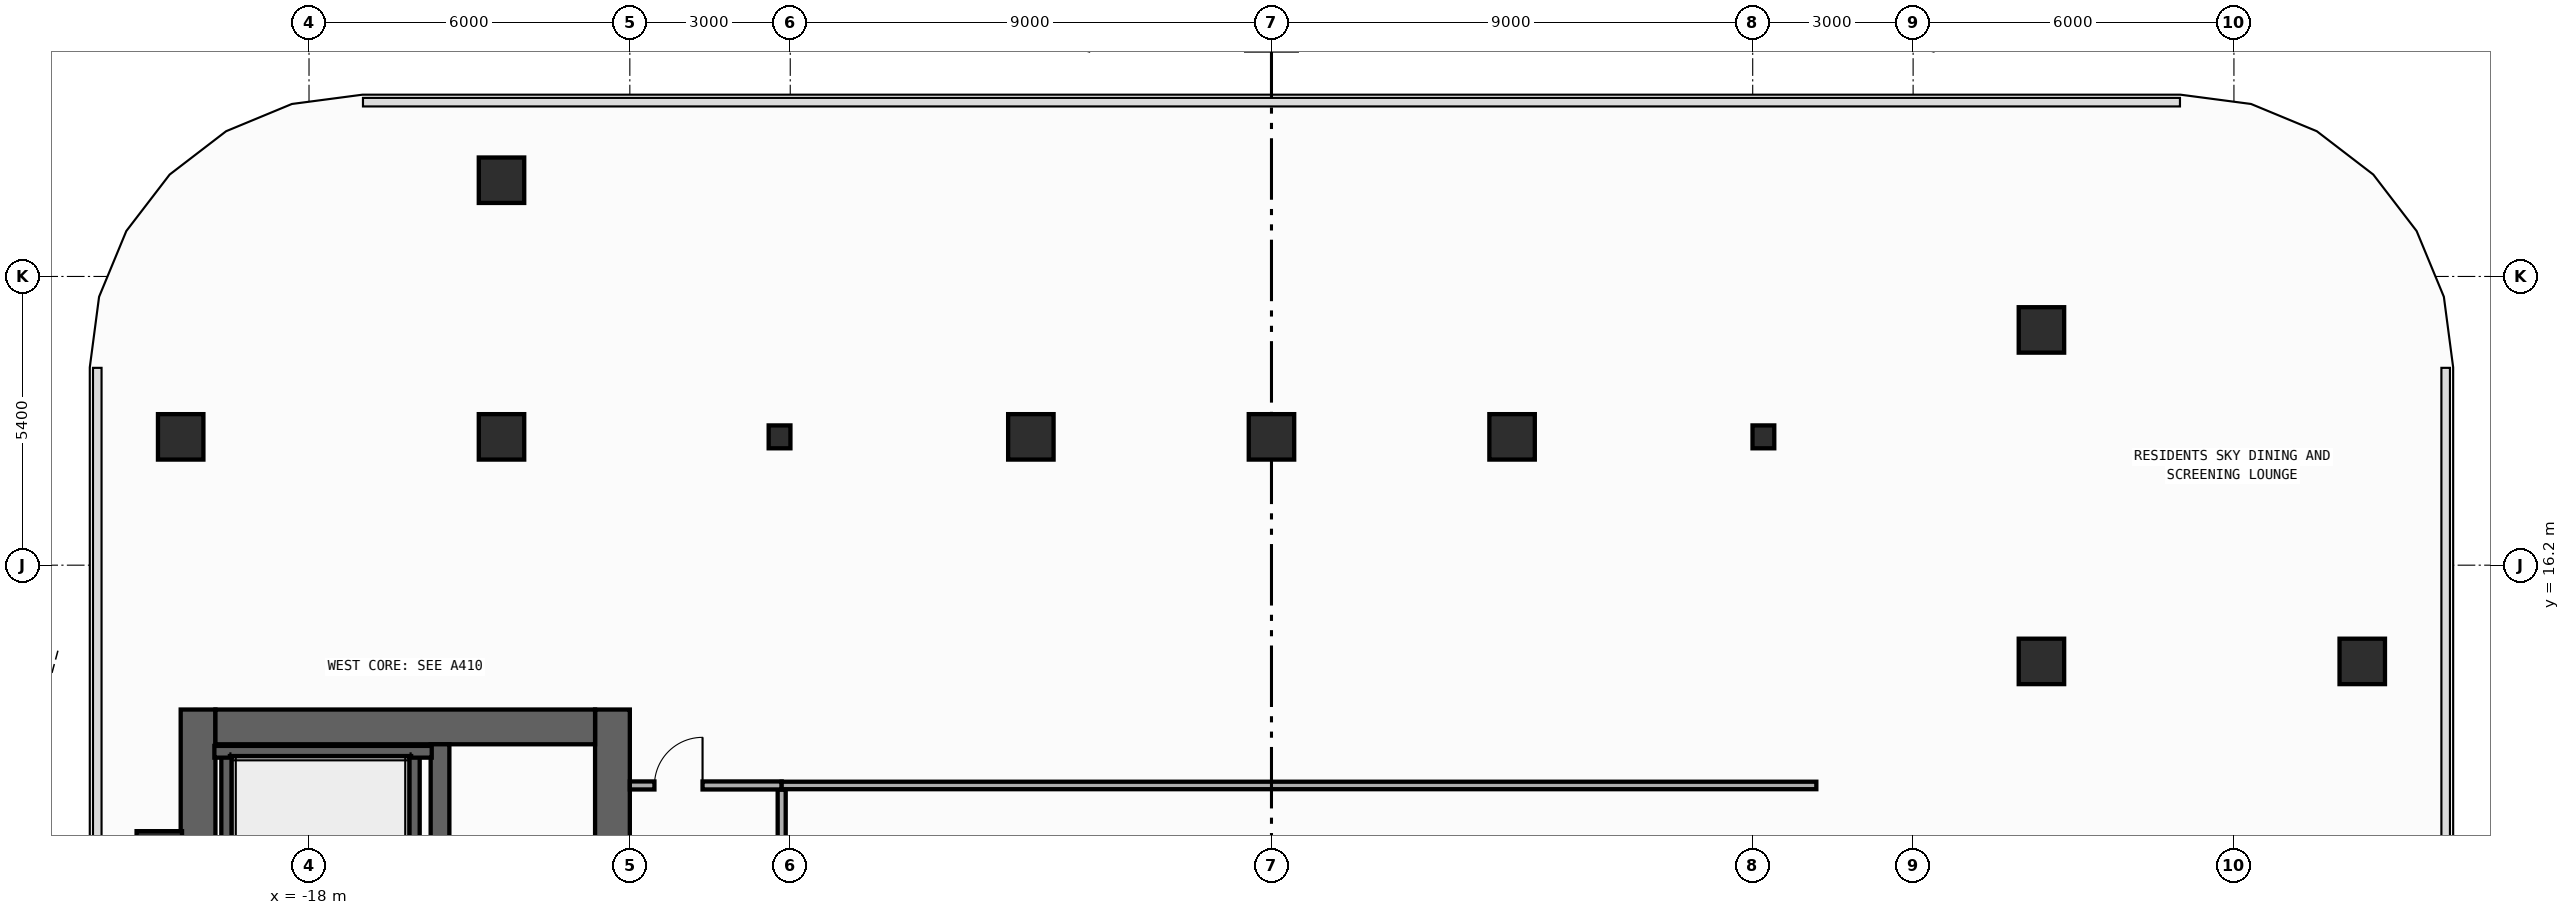
"""IFC4 building model, lengths in metres.
Left out: names, types, materials, properties, quantities, classifications, styles, units other than length and angle.
Written with IfcOpenShell. Run it as: python <this file> out.ifc"""

import sys

from ifc_helpers import new_model, si_unit, direction, frame, frame_2d, origin, origin_2d, place, context, subcontext, project, spatial, rectangle, i_section, extrude, element, fill, save


model = new_model("IFC4")
c1 = context("Model", 3, precision=1e-05, world=origin(), true_north=direction((0.0, 1.0)))
c2 = subcontext(c1, "Body", "Model", "MODEL_VIEW")
j1 = project(units=[si_unit("LENGTHUNIT", "METRE"), si_unit("PLANEANGLEUNIT", "RADIAN")], contexts=[c1])
p1 = place(None, origin())
s1 = spatial("IfcSite", under=j1, at=p1, CompositionType="ELEMENT")
p2 = place(p1, origin())
s2 = spatial("IfcBuilding", under=s1, at=p2, CompositionType="ELEMENT")
p3 = place(p2, frame((0.0, 0.0, 222.4)))
s3 = spatial("IfcBuildingStorey", under=s2, at=p3, CompositionType="ELEMENT", Elevation=222.4)
p4 = place(p3, frame((-20.075, -13.5, 0.0), z_axis=(0.0, 0.0, 1.0), x_axis=(0.0, 1.0, 0.0)))
e1 = element("IfcWall", 1, at=p4, inside=s3, PredefinedType="SHEAR", context=c2, shape_type="SweptSolid", body=[
    extrude(rectangle(XDim=27.0, YDim=0.65, at=frame_2d((13.5, 0.0))), origin(), (0.0, 0.0, 1.0), 3.34),
])
p5 = place(p3, frame((-12.325, -13.5, 0.0), z_axis=(0.0, 0.0, 1.0), x_axis=(0.0, 1.0, 0.0)))
e2 = element("IfcWall", 2, at=p5, inside=s3, PredefinedType="SHEAR", context=c2, shape_type="SweptSolid", body=[
    extrude(rectangle(XDim=27.0, YDim=0.65, at=frame_2d((13.5, 0.0))), origin(), (0.0, 0.0, 1.0), 3.34),
])
p6 = place(p5, frame((15.175, 0.0, 0.0)))
e3 = element("IfcOpeningElement", 3, at=p6, cuts=e2, PredefinedType="OPENING", context=c2, shape_type="SweptSolid", body=[
    extrude(rectangle(XDim=0.85, YDim=2.1, at=frame_2d((0.425, 1.05))), frame((0.0, 0.335, 0.0), z_axis=(0.0, -1.0, 0.0), x_axis=(1.0, 0.0, 0.0)), (0.0, 0.0, 1.0), 0.67),
])
p7 = place(p5, frame((21.275, 0.0, 0.0)))
e4 = element("IfcOpeningElement", 4, at=p7, cuts=e2, PredefinedType="OPENING", context=c2, shape_type="SweptSolid", body=[
    extrude(rectangle(XDim=0.85, YDim=2.1, at=frame_2d((0.425, 1.05))), frame((0.0, 0.335, 0.0), z_axis=(0.0, -1.0, 0.0), x_axis=(1.0, 0.0, 0.0)), (0.0, 0.0, 1.0), 0.67),
])
p8 = place(p5, frame((4.275, 0.0, 0.0)))
e5 = element("IfcOpeningElement", 5, at=p8, cuts=e2, PredefinedType="OPENING", context=c2, shape_type="SweptSolid", body=[
    extrude(rectangle(XDim=0.85, YDim=2.1, at=frame_2d((0.425, 1.05))), frame((0.0, 0.335, 0.0), z_axis=(0.0, -1.0, 0.0), x_axis=(1.0, 0.0, 0.0)), (0.0, 0.0, 1.0), 0.67),
])
p9 = place(p5, frame((10.275, 0.0, 0.0)))
e6 = element("IfcOpeningElement", 6, at=p9, cuts=e2, PredefinedType="OPENING", context=c2, shape_type="SweptSolid", body=[
    extrude(rectangle(XDim=0.85, YDim=2.1, at=frame_2d((0.425, 1.05))), frame((0.0, 0.335, 0.0), z_axis=(0.0, -1.0, 0.0), x_axis=(1.0, 0.0, 0.0)), (0.0, 0.0, 1.0), 0.67),
])
p10 = place(p5, frame((12.725, 0.0, 0.0)))
e7 = element("IfcOpeningElement", 7, at=p10, cuts=e2, PredefinedType="OPENING", context=c2, shape_type="SweptSolid", body=[
    extrude(rectangle(XDim=1.15, YDim=2.2, at=frame_2d((0.575, 1.1))), frame((0.0, 0.335, 0.0), z_axis=(0.0, -1.0, 0.0), x_axis=(1.0, 0.0, 0.0)), (0.0, 0.0, 1.0), 0.67),
])
p11 = place(p5, frame((1.625, 0.0, 0.0)))
e8 = element("IfcOpeningElement", 8, at=p11, cuts=e2, PredefinedType="OPENING", context=c2, shape_type="SweptSolid", body=[
    extrude(rectangle(XDim=0.85, YDim=2.1, at=frame_2d((0.425, 1.05))), frame((0.0, 0.335, 0.0), z_axis=(0.0, -1.0, 0.0), x_axis=(1.0, 0.0, 0.0)), (0.0, 0.0, 1.0), 0.67),
])
p12 = place(p3, frame((-19.75, 13.175, 0.0), z_axis=(0.0, 0.0, 1.0), x_axis=(1.0, 0.0, 0.0)))
e9 = element("IfcWall", 9, at=p12, inside=s3, PredefinedType="SHEAR", context=c2, shape_type="SweptSolid", body=[
    extrude(rectangle(XDim=7.1, YDim=0.65, at=frame_2d((3.55, 0.0))), origin(), (0.0, 0.0, 1.0), 3.34),
])
p13 = place(p3, frame((-15.55, -12.85, 0.0), z_axis=(0.0, 0.0, 1.0), x_axis=(0.0, 1.0, 0.0)))
e10 = element("IfcWall", 10, at=p13, inside=s3, PredefinedType="SHEAR", context=c2, shape_type="SweptSolid", body=[
    extrude(rectangle(XDim=25.7, YDim=0.35, at=frame_2d((12.85, 0.0))), origin(), (0.0, 0.0, 1.0), 3.34),
])
p14 = place(p13, frame((12.075, 0.0, 0.0)))
e11 = element("IfcOpeningElement", 11, at=p14, cuts=e10, PredefinedType="OPENING", context=c2, shape_type="SweptSolid", body=[
    extrude(rectangle(XDim=1.15, YDim=2.2, at=frame_2d((0.575, 1.1))), frame((0.0, 0.185, 0.0), z_axis=(0.0, -1.0, 0.0), x_axis=(1.0, 0.0, 0.0)), (0.0, 0.0, 1.0), 0.37),
])
p15 = place(p13, frame((0.975, 0.0, 0.0)))
e12 = element("IfcOpeningElement", 12, at=p15, cuts=e10, PredefinedType="OPENING", context=c2, shape_type="SweptSolid", body=[
    extrude(rectangle(XDim=0.85, YDim=2.1, at=frame_2d((0.425, 1.05))), frame((0.0, 0.185, 0.0), z_axis=(0.0, -1.0, 0.0), x_axis=(1.0, 0.0, 0.0)), (0.0, 0.0, 1.0), 0.37),
])
for number, where, z_axis, x_axis in (
    (13, (-16.04, 1.29, 0.0), (0.0, 0.0, 1.0), (0.0, 1.0, 0.0)),
    (14, (-19.53, 1.29, 0.0), (0.0, 0.0, 1.0), (0.0, 1.0, 0.0)),
):
    element("IfcWall", number, at=place(p3, frame(where, z_axis=z_axis, x_axis=x_axis)), inside=s3, PredefinedType="SHEAR", context=c2, shape_type="SweptSolid", body=[
        extrude(rectangle(XDim=11.42, YDim=0.22, at=frame_2d((5.71, 0.0))), origin(), (0.0, 0.0, 1.0), 3.34),
    ])
p16 = place(p3, frame((-19.77, 12.71, 0.0), z_axis=(0.0, 0.0, 1.0), x_axis=(1.0, 0.0, 0.0)))
e15 = element("IfcWall", 15, at=p16, inside=s3, PredefinedType="SHEAR", context=c2, shape_type="SweptSolid", body=[
    extrude(rectangle(XDim=4.065, YDim=0.22, at=frame_2d((2.032, 0.0))), origin(), (0.0, 0.0, 1.0), 3.34),
])
for number, where, z_axis, x_axis in (
    (16, (-9.2, 18.6, 0.0), (0.0, 0.0, 1.0), (1.0, 0.0, 0.0)),
    (17, (9.2, 18.6, 0.0), (0.0, 0.0, 1.0), (1.0, 0.0, 0.0)),
):
    element("IfcColumn", number, at=place(p3, frame(where, z_axis=z_axis, x_axis=x_axis)), inside=s3, PredefinedType="COLUMN", context=c2, shape_type="SweptSolid", body=[
        extrude(i_section(OverallWidth=0.407, OverallDepth=0.428, WebThickness=0.02, FlangeThickness=0.035, FilletRadius=0.022, at=origin_2d()), origin(), (0.0, 0.0, 1.0), 3.6),
    ])
for number, where, z_axis, x_axis in (
    (18, (-20.4, 18.6, 0.0), (0.0, 0.0, 1.0), (1.0, 0.0, 0.0)),
    (19, (20.4, 14.4, 0.0), (0.0, 0.0, 1.0), (1.0, 0.0, 0.0)),
    (20, (-14.4, 18.6, 0.0), (0.0, 0.0, 1.0), (1.0, 0.0, 0.0)),
    (21, (14.4, 14.4, 0.0), (0.0, 0.0, 1.0), (1.0, 0.0, 0.0)),
    (22, (-4.5, 18.6, 0.0), (0.0, 0.0, 1.0), (1.0, 0.0, 0.0)),
    (23, (0.0, 18.6, 0.0), (0.0, 0.0, 1.0), (1.0, 0.0, 0.0)),
    (24, (4.5, 18.6, 0.0), (0.0, 0.0, 1.0), (1.0, 0.0, 0.0)),
    (25, (-20.8, 10.8, 0.0), (0.0, 0.0, 1.0), (1.0, 0.0, 0.0)),
    (26, (-14.4, 23.4, 0.0), (0.0, 0.0, 1.0), (1.0, 0.0, 0.0)),
    (27, (14.4, 20.6, 0.0), (0.0, 0.0, 1.0), (1.0, 0.0, 0.0)),
):
    element("IfcColumn", number, at=place(p3, frame(where, z_axis=z_axis, x_axis=x_axis)), inside=s3, PredefinedType="COLUMN", context=c2, shape_type="SweptSolid", body=[
        extrude(rectangle(XDim=0.85, YDim=0.85, at=origin_2d()), origin(), (0.0, 0.0, 1.0), 3.6),
    ])
p17 = place(p3, frame((-9.16, -0.995, 0.0), z_axis=(0.0, 0.0, 1.0), x_axis=(0.0, 1.0, 0.0)))
e28 = element("IfcWall", 28, at=p17, inside=s3, PredefinedType="PARTITIONING", context=c2, shape_type="SweptSolid", body=[
    extrude(rectangle(XDim=13.0, YDim=0.15, at=frame_2d((6.5, 0.0))), origin(), (0.0, 0.0, 1.0), 2.44),
])
p18 = place(p17, frame((5.948, 0.0, 0.0)))
e29 = element("IfcOpeningElement", 29, at=p18, cuts=e28, PredefinedType="OPENING", context=c2, shape_type="SweptSolid", body=[
    extrude(rectangle(XDim=0.9, YDim=2.15, at=frame_2d((0.45, 1.075))), frame((0.0, 0.085, 0.0), z_axis=(0.0, -1.0, 0.0), x_axis=(1.0, 0.0, 0.0)), (0.0, 0.0, 1.0), 0.17),
])
p19 = place(p3, frame((-12.0, 12.08, 0.0), z_axis=(0.0, 0.0, 1.0), x_axis=(1.0, 0.0, 0.0)))
e30 = element("IfcWall", 30, at=p19, inside=s3, PredefinedType="PARTITIONING", context=c2, shape_type="SweptSolid", body=[
    extrude(rectangle(XDim=2.84, YDim=0.15, at=frame_2d((1.42, 0.0))), origin(), (0.0, 0.0, 1.0), 3.34),
])
p20 = place(p19, frame((0.46, 0.0, 0.0)))
e31 = element("IfcOpeningElement", 31, at=p20, cuts=e30, PredefinedType="OPENING", context=c2, shape_type="SweptSolid", body=[
    extrude(rectangle(XDim=0.9, YDim=2.15, at=frame_2d((0.45, 1.075))), frame((0.0, 0.085, 0.0), z_axis=(0.0, -1.0, 0.0), x_axis=(1.0, 0.0, 0.0)), (0.0, 0.0, 1.0), 0.17),
])
p21 = place(p3, frame((-9.16, 12.08, 0.0), z_axis=(0.0, 0.0, 1.0), x_axis=(1.0, 0.0, 0.0)))
e32 = element("IfcWall", 32, at=p21, inside=s3, PredefinedType="PARTITIONING", context=c2, shape_type="SweptSolid", body=[
    extrude(rectangle(XDim=19.35, YDim=0.14, at=frame_2d((9.675, 0.0))), origin(), (0.0, 0.0, 1.0), 3.34),
])
p22 = place(p20, origin())
e33 = element("IfcDoor", 33, at=p22, inside=s3, OperationType="SINGLE_SWING_RIGHT", PredefinedType="DOOR", context=c2, shape_type="SweptSolid", body=[
    extrude(rectangle(XDim=0.9, YDim=2.15, at=frame_2d((0.45, 1.075))), frame((0.0, 0.025, 0.0), z_axis=(0.0, -1.0, 0.0), x_axis=(1.0, 0.0, 0.0)), (0.0, 0.0, 1.0), 0.05),
])
fill(e31, e33)
save(model, sys.argv[1])
